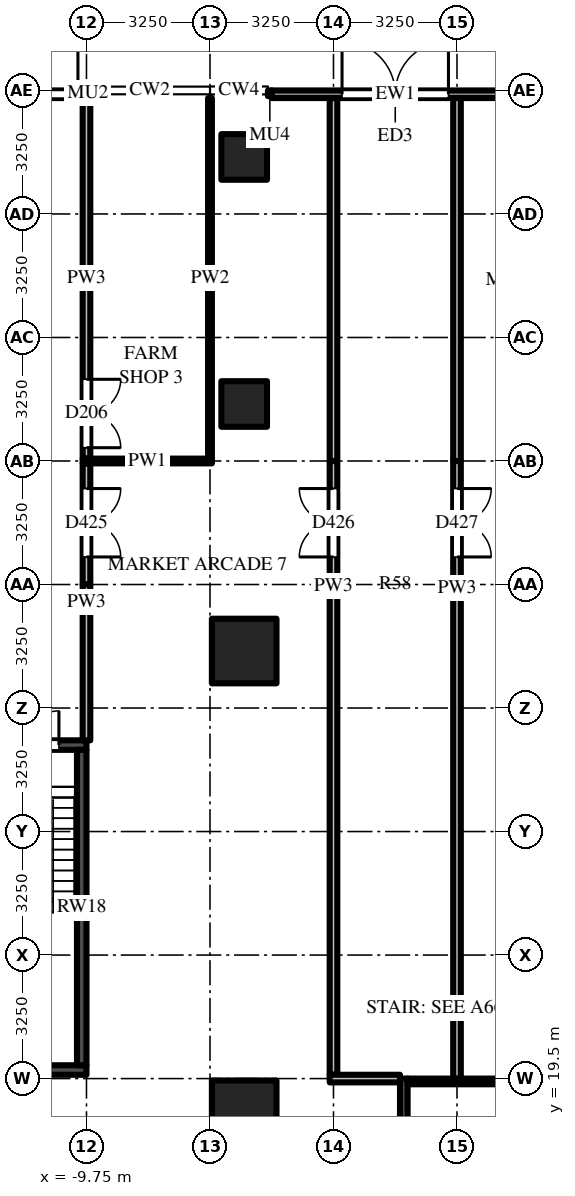
"""IFC4 building model, lengths in metres.
Left out: names, types, materials, properties, quantities, classifications, styles, units other than length and angle.
Written with IfcOpenShell. Run it as: python <this file> out.ifc"""

import sys

from ifc_helpers import new_model, si_unit, direction, frame, frame_2d, origin, origin_2d, place, context, subcontext, project, spatial, rectangle, extrude, source, transform, mapped, element, fill, save


model = new_model("IFC4")
c1 = context("Model", 3, precision=1e-05, world=origin(), true_north=direction((0.0, 1.0)))
c2 = subcontext(c1, "Body", "Model", "MODEL_VIEW")
j1 = project(units=[si_unit("LENGTHUNIT", "METRE"), si_unit("PLANEANGLEUNIT", "RADIAN")], contexts=[c1])
p1 = place(None, origin())
s1 = spatial("IfcSite", under=j1, at=p1, CompositionType="ELEMENT")
p2 = place(p1, origin())
s2 = spatial("IfcBuilding", under=s1, at=p2, CompositionType="ELEMENT")
p3 = place(p2, origin())
s3 = spatial("IfcBuildingStorey", under=s2, at=p3, CompositionType="ELEMENT", Elevation=0.0)
m1 = source(origin(), c2, "Body", "SweptSolid", [
    extrude(rectangle(XDim=1.7, YDim=1.7, at=origin_2d()), origin(), (0.0, 0.0, 1.0), 8.5),
])
for number, where, z_axis, x_axis in (
    (1, (-5.6, 18.6, -0.5), (0.0, 0.0, 1.0), (1.0, 0.0, 0.0)),
    (2, (-5.6, 30.75, -0.5), (0.0, 0.0, 1.0), (1.0, 0.0, 0.0)),
):
    element("IfcColumn", number, at=place(p3, frame(where, z_axis=z_axis, x_axis=x_axis)), inside=s3, PredefinedType="COLUMN", context=c2, shape_type="MappedRepresentation", body=[
        mapped(m1, transform((0.0, 0.0, 0.0))),
    ])
m2 = source(origin(), c2, "Body", "SweptSolid", [
    extrude(rectangle(XDim=1.2, YDim=1.2, at=origin_2d()), origin(), (0.0, 0.0, 1.0), 8.5),
])
for number, where, z_axis, x_axis in (
    (3, (-5.6, 37.25, -0.5), (0.0, 0.0, 1.0), (1.0, 0.0, 0.0)),
    (4, (-5.6, 43.75, -0.5), (0.0, 0.0, 1.0), (1.0, 0.0, 0.0)),
):
    element("IfcColumn", number, at=place(p3, frame(where, z_axis=z_axis, x_axis=x_axis)), inside=s3, PredefinedType="COLUMN", context=c2, shape_type="MappedRepresentation", body=[
        mapped(m2, transform((0.0, 0.0, 0.0))),
    ])
m3 = source(origin(), c2, "Body", "SweptSolid", [
    extrude(rectangle(XDim=6.0, YDim=0.2, at=frame_2d((3.0, 0.0))), origin(), (0.0, 0.0, 1.0), 7.7),
])
p4 = place(p3, frame((-1.4, 13.5, 0.0), z_axis=(0.0, 0.0, 1.0), x_axis=(0.0, 1.0, 0.0)))
e5 = element("IfcWall", 5, at=p4, inside=s3, PredefinedType="SHEAR", context=c2, shape_type="MappedRepresentation", body=[
    mapped(m3, transform((0.0, 0.0, 0.0))),
])
m4 = source(origin(), c2, "Body", "SweptSolid", [
    extrude(rectangle(XDim=2.6, YDim=0.15, at=frame_2d((1.3, 0.0))), origin(), (0.0, 0.0, 1.0), 7.7),
])
p5 = place(p3, frame((-1.3, 19.425, 0.0), z_axis=(0.0, 0.0, 1.0), x_axis=(1.0, 0.0, 0.0)))
e6 = element("IfcWall", 6, at=p5, inside=s3, PredefinedType="SHEAR", context=c2, shape_type="MappedRepresentation", body=[
    mapped(m4, transform((0.0, 0.0, 0.0))),
])
m5 = source(origin(), c2, "Body", "SweptSolid", [
    extrude(rectangle(XDim=6.5, YDim=0.25, at=frame_2d((3.25, 0.0))), origin(), (0.0, 0.0, 1.0), 7.7),
])
p6 = place(p3, frame((-16.25, 28.275, 0.0), z_axis=(0.0, 0.0, 1.0), x_axis=(1.0, 0.0, 0.0)))
e7 = element("IfcWall", 7, at=p6, inside=s3, PredefinedType="SHEAR", context=c2, shape_type="MappedRepresentation", body=[
    mapped(m5, transform((0.0, 0.0, 0.0))),
])
m6 = source(origin(), c2, "Body", "SweptSolid", [
    extrude(rectangle(XDim=1.8, YDim=2.1, at=frame_2d((0.9, 1.05))), frame((0.0, 0.135, 0.0), z_axis=(0.0, -1.0, 0.0), x_axis=(1.0, 0.0, 0.0)), (0.0, 0.0, 1.0), 0.27),
])
p7 = place(p6, frame((0.725, 0.0, 0.0)))
e8 = element("IfcOpeningElement", 8, at=p7, cuts=e7, PredefinedType="OPENING", context=c2, shape_type="MappedRepresentation", body=[
    mapped(m6, transform((0.0, 0.0, 0.0))),
])
p8 = place(p6, frame((3.975, 0.0, 0.0)))
e9 = element("IfcOpeningElement", 9, at=p8, cuts=e7, PredefinedType="OPENING", context=c2, shape_type="MappedRepresentation", body=[
    mapped(m6, transform((0.0, 0.0, 0.0))),
])
p9 = place(p3, frame((-16.25, 19.725, 0.0), z_axis=(0.0, 0.0, 1.0), x_axis=(1.0, 0.0, 0.0)))
e10 = element("IfcWall", 10, at=p9, inside=s3, PredefinedType="SHEAR", context=c2, shape_type="MappedRepresentation", body=[
    mapped(m5, transform((0.0, 0.0, 0.0))),
])
m7 = source(origin(), c2, "Body", "SweptSolid", [
    extrude(rectangle(XDim=8.3, YDim=0.25, at=frame_2d((4.15, 0.0))), origin(), (0.0, 0.0, 1.0), 7.7),
])
p10 = place(p3, frame((-9.875, 19.85, 0.0), z_axis=(0.0, 0.0, 1.0), x_axis=(0.0, 1.0, 0.0)))
e11 = element("IfcWall", 11, at=p10, inside=s3, PredefinedType="SHEAR", context=c2, shape_type="MappedRepresentation", body=[
    mapped(m7, transform((0.0, 0.0, 0.0))),
])
m8 = source(origin(), c2, "Body", "SweptSolid", [
    extrude(rectangle(XDim=6.5, YDim=0.2, at=frame_2d((3.25, 0.0))), origin(), (0.0, 0.0, 1.0), 7.7),
])
p11 = place(p3, frame((-4.875, 45.4, 0.0), z_axis=(0.0, 0.0, 1.0), x_axis=(1.0, 0.0, 0.0)))
e12 = element("IfcWall", 12, at=p11, inside=s3, PredefinedType="SOLIDWALL", context=c2, shape_type="MappedRepresentation", body=[
    mapped(m8, transform((0.0, 0.0, 0.0))),
])
m9 = source(origin(), c2, "Body", "SweptSolid", [
    extrude(rectangle(XDim=2.8, YDim=2.6, at=frame_2d((1.4, 1.3))), frame((0.0, 0.11, 0.0), z_axis=(0.0, -1.0, 0.0), x_axis=(1.0, 0.0, 0.0)), (0.0, 0.0, 1.0), 0.22),
])
p12 = place(p11, frame((1.85, 0.0, 0.0)))
e13 = element("IfcOpeningElement", 13, at=p12, cuts=e12, PredefinedType="OPENING", context=c2, shape_type="MappedRepresentation", body=[
    mapped(m9, transform((0.0, 0.0, 0.0))),
])
m10 = source(origin(), c2, "Body", "SweptSolid", [
    extrude(rectangle(XDim=3.25, YDim=0.2, at=frame_2d((1.625, 0.0))), origin(), (0.0, 0.0, 1.0), 7.7),
])
p13 = place(p3, frame((-13.0, 45.4, 0.0), z_axis=(0.0, 0.0, 1.0), x_axis=(1.0, 0.0, 0.0)))
e14 = element("IfcWall", 14, at=p13, inside=s3, PredefinedType="SOLIDWALL", context=c2, shape_type="MappedRepresentation", body=[
    mapped(m10, transform((0.0, 0.0, 0.0))),
])
m11 = source(origin(), c2, "Body", "SweptSolid", [
    extrude(rectangle(XDim=2.8, YDim=2.4, at=frame_2d((1.4, 1.2))), frame((0.0, 0.11, 0.0), z_axis=(0.0, -1.0, 0.0), x_axis=(1.0, 0.0, 0.0)), (0.0, 0.0, 1.0), 0.22),
])
p14 = place(p13, frame((0.225, 0.0, 0.0)))
e15 = element("IfcOpeningElement", 15, at=p14, cuts=e14, PredefinedType="OPENING", context=c2, shape_type="MappedRepresentation", body=[
    mapped(m11, transform((0.0, 0.0, 0.0))),
])
m12 = source(origin(), c2, "Body", "SweptSolid", [
    extrude(rectangle(XDim=3.188, YDim=0.2, at=frame_2d((1.594, 0.0))), origin(), (0.0, 0.0, 1.0), 6.997),
])
p15 = place(p3, frame((-9.75, 35.688, 0.0), z_axis=(0.0, 0.0, 1.0), x_axis=(0.0, -1.0, 0.0)))
e16 = element("IfcWall", 16, at=p15, inside=s3, PredefinedType="PARTITIONING", context=c2, shape_type="MappedRepresentation", body=[
    mapped(m12, transform((0.0, 0.0, 0.0))),
])
m13 = source(origin(), c2, "Body", "SweptSolid", [
    extrude(rectangle(XDim=1.8, YDim=2.1, at=frame_2d((0.9, 1.05))), frame((0.0, 0.11, 0.0), z_axis=(0.0, -1.0, 0.0), x_axis=(1.0, 0.0, 0.0)), (0.0, 0.0, 1.0), 0.22),
])
p16 = place(p15, frame((0.663, 0.0, 0.0)))
e17 = element("IfcOpeningElement", 17, at=p16, cuts=e16, PredefinedType="OPENING", context=c2, shape_type="MappedRepresentation", body=[
    mapped(m13, transform((0.0, 0.0, 0.0))),
])
m14 = source(origin(), c2, "Body", "SweptSolid", [
    extrude(rectangle(XDim=9.488, YDim=0.2, at=frame_2d((4.744, 0.0))), origin(), (0.0, 0.0, 1.0), 6.762),
])
p17 = place(p3, frame((-9.75, 45.3, 0.0), z_axis=(0.0, 0.0, 1.0), x_axis=(0.0, -1.0, 0.0)))
e18 = element("IfcWall", 18, at=p17, inside=s3, PredefinedType="PARTITIONING", context=c2, shape_type="MappedRepresentation", body=[
    mapped(m14, transform((0.0, 0.0, 0.0))),
])
p18 = place(p17, frame((7.4, 0.0, 0.0)))
e19 = element("IfcOpeningElement", 19, at=p18, cuts=e18, PredefinedType="OPENING", context=c2, shape_type="MappedRepresentation", body=[
    mapped(m13, transform((0.0, 0.0, 0.0))),
])
m15 = source(origin(), c2, "Body", "SweptSolid", [
    extrude(rectangle(XDim=4.1, YDim=0.2, at=frame_2d((2.05, 0.0))), origin(), (0.0, 0.0, 1.0), 6.762),
])
p19 = place(p3, frame((-9.75, 28.4, 0.0), z_axis=(0.0, 0.0, 1.0), x_axis=(0.0, 1.0, 0.0)))
e20 = element("IfcWall", 20, at=p19, inside=s3, PredefinedType="PARTITIONING", context=c2, shape_type="MappedRepresentation", body=[
    mapped(m15, transform((0.0, 0.0, 0.0))),
])
p20 = place(p3, frame((-6.5, 35.812, 0.0), z_axis=(0.0, 0.0, 1.0), x_axis=(0.0, 1.0, 0.0)))
e21 = element("IfcWall", 21, at=p20, inside=s3, PredefinedType="PARTITIONING", context=c2, shape_type="SweptSolid", body=[
    extrude(rectangle(XDim=9.488, YDim=0.1, at=frame_2d((4.744, 0.0))), origin(), (0.0, 0.0, 1.0), 6.762),
])
m16 = source(origin(), c2, "Body", "SweptSolid", [
    extrude(rectangle(XDim=3.25, YDim=0.2, at=frame_2d((1.625, 0.0))), origin(), (0.0, 0.0, 1.0), 6.997),
])
p21 = place(p3, frame((-3.25, 32.5, 0.0), z_axis=(0.0, 0.0, 1.0), x_axis=(0.0, 1.0, 0.0)))
e22 = element("IfcWall", 22, at=p21, inside=s3, PredefinedType="PARTITIONING", context=c2, shape_type="MappedRepresentation", body=[
    mapped(m16, transform((0.0, 0.0, 0.0))),
])
p22 = place(p21, frame((0.725, 0.0, 0.0)))
e23 = element("IfcOpeningElement", 23, at=p22, cuts=e22, PredefinedType="OPENING", context=c2, shape_type="MappedRepresentation", body=[
    mapped(m13, transform((0.0, 0.0, 0.0))),
])
m17 = source(origin(), c2, "Body", "SweptSolid", [
    extrude(rectangle(XDim=12.9, YDim=0.2, at=frame_2d((6.45, 0.0))), origin(), (0.0, 0.0, 1.0), 6.918),
])
p23 = place(p3, frame((-3.25, 19.6, 0.0), z_axis=(0.0, 0.0, 1.0), x_axis=(0.0, 1.0, 0.0)))
e24 = element("IfcWall", 24, at=p23, inside=s3, PredefinedType="PARTITIONING", context=c2, shape_type="MappedRepresentation", body=[
    mapped(m17, transform((0.0, 0.0, 0.0))),
])
m18 = source(origin(), c2, "Body", "SweptSolid", [
    extrude(rectangle(XDim=9.55, YDim=0.2, at=frame_2d((4.775, 0.0))), origin(), (0.0, 0.0, 1.0), 6.918),
])
p24 = place(p3, frame((-3.25, 35.75, 0.0), z_axis=(0.0, 0.0, 1.0), x_axis=(0.0, 1.0, 0.0)))
e25 = element("IfcWall", 25, at=p24, inside=s3, PredefinedType="PARTITIONING", context=c2, shape_type="MappedRepresentation", body=[
    mapped(m18, transform((0.0, 0.0, 0.0))),
])
p25 = place(p3, frame((0.0, 35.75, 0.0), z_axis=(0.0, 0.0, 1.0), x_axis=(0.0, -1.0, 0.0)))
e26 = element("IfcWall", 26, at=p25, inside=s3, PredefinedType="PARTITIONING", context=c2, shape_type="MappedRepresentation", body=[
    mapped(m16, transform((0.0, 0.0, 0.0))),
])
p26 = place(p25, frame((0.725, 0.0, 0.0)))
e27 = element("IfcOpeningElement", 27, at=p26, cuts=e26, PredefinedType="OPENING", context=c2, shape_type="MappedRepresentation", body=[
    mapped(m13, transform((0.0, 0.0, 0.0))),
])
p27 = place(p3, frame((0.0, 45.3, 0.0), z_axis=(0.0, 0.0, 1.0), x_axis=(0.0, -1.0, 0.0)))
e28 = element("IfcWall", 28, at=p27, inside=s3, PredefinedType="PARTITIONING", context=c2, shape_type="MappedRepresentation", body=[
    mapped(m18, transform((0.0, 0.0, 0.0))),
])
m19 = source(origin(), c2, "Body", "SweptSolid", [
    extrude(rectangle(XDim=13.0, YDim=0.2, at=frame_2d((6.5, 0.0))), origin(), (0.0, 0.0, 1.0), 6.918),
])
p28 = place(p3, frame((0.0, 19.5, 0.0), z_axis=(0.0, 0.0, 1.0), x_axis=(0.0, 1.0, 0.0)))
e29 = element("IfcWall", 29, at=p28, inside=s3, PredefinedType="PARTITIONING", context=c2, shape_type="MappedRepresentation", body=[
    mapped(m19, transform((0.0, 0.0, 0.0))),
])
m20 = source(origin(), c2, "Body", "SweptSolid", [
    extrude(rectangle(XDim=1.85, YDim=0.2, at=frame_2d((0.925, 0.0))), origin(), (0.0, 0.0, 1.0), 6.997),
])
p29 = place(p3, frame((-1.5, 19.5, 0.0), z_axis=(0.0, 0.0, 1.0), x_axis=(-1.0, 0.0, 0.0)))
e30 = element("IfcWall", 30, at=p29, inside=s3, PredefinedType="PARTITIONING", context=c2, shape_type="MappedRepresentation", body=[
    mapped(m20, transform((0.0, 0.0, 0.0))),
])
p30 = place(p3, frame((-9.85, 35.75, 0.0), z_axis=(0.0, 0.0, 1.0), x_axis=(1.0, 0.0, 0.0)))
e31 = element("IfcWall", 31, at=p30, inside=s3, PredefinedType="PARTITIONING", context=c2, shape_type="SweptSolid", body=[
    extrude(rectangle(XDim=3.4, YDim=0.125, at=frame_2d((1.7, 0.0))), origin(), (0.0, 0.0, 1.0), 7.7),
])
m21 = source(origin(), c2, "Body", "SweptSolid", [
    extrude(rectangle(XDim=1.8, YDim=2.1, at=frame_2d((0.9, 1.05))), frame((0.0, 0.025, 0.0), z_axis=(0.0, -1.0, 0.0), x_axis=(1.0, 0.0, 0.0)), (0.0, 0.0, 1.0), 0.05),
])
p31 = place(p8, origin())
e32 = element("IfcDoor", 32, at=p31, inside=s3, OperationType="DOUBLE_DOOR_SINGLE_SWING", PredefinedType="DOOR", context=c2, shape_type="MappedRepresentation", body=[
    mapped(m21, transform((0.0, 0.0, 0.0))),
])
fill(e9, e32)
m22 = source(origin(), c2, "Body", "SweptSolid", [
    extrude(rectangle(XDim=2.8, YDim=2.6, at=frame_2d((1.4, 1.3))), frame((0.0, 0.025, 0.0), z_axis=(0.0, -1.0, 0.0), x_axis=(1.0, 0.0, 0.0)), (0.0, 0.0, 1.0), 0.05),
])
p32 = place(p12, origin())
e33 = element("IfcDoor", 33, at=p32, inside=s3, OperationType="DOUBLE_DOOR_SINGLE_SWING", PredefinedType="DOOR", context=c2, shape_type="MappedRepresentation", body=[
    mapped(m22, transform((0.0, 0.0, 0.0))),
])
fill(e13, e33)
m23 = source(origin(), c2, "Body", "SweptSolid", [
    extrude(rectangle(XDim=2.8, YDim=2.4, at=frame_2d((1.4, 1.2))), frame((0.0, 0.025, 0.0), z_axis=(0.0, -1.0, 0.0), x_axis=(1.0, 0.0, 0.0)), (0.0, 0.0, 1.0), 0.05),
])
p33 = place(p14, origin())
e34 = element("IfcDoor", 34, at=p33, inside=s3, OperationType="DOUBLE_DOOR_SINGLE_SWING", PredefinedType="DOOR", context=c2, shape_type="MappedRepresentation", body=[
    mapped(m23, transform((0.0, 0.0, 0.0))),
])
fill(e15, e34)
p34 = place(p16, origin())
e35 = element("IfcDoor", 35, at=p34, inside=s3, OperationType="DOUBLE_DOOR_SINGLE_SWING", PredefinedType="DOOR", context=c2, shape_type="MappedRepresentation", body=[
    mapped(m21, transform((0.0, 0.0, 0.0))),
])
fill(e17, e35)
p35 = place(p22, origin())
e36 = element("IfcDoor", 36, at=p35, inside=s3, OperationType="DOUBLE_DOOR_SINGLE_SWING", PredefinedType="DOOR", context=c2, shape_type="MappedRepresentation", body=[
    mapped(m21, transform((0.0, 0.0, 0.0))),
])
fill(e23, e36)
p36 = place(p26, origin())
e37 = element("IfcDoor", 37, at=p36, inside=s3, OperationType="DOUBLE_DOOR_SINGLE_SWING", PredefinedType="DOOR", context=c2, shape_type="MappedRepresentation", body=[
    mapped(m21, transform((0.0, 0.0, 0.0))),
])
fill(e27, e37)
p37 = place(p18, origin())
e38 = element("IfcDoor", 38, at=p37, inside=s3, OperationType="DOUBLE_DOOR_SINGLE_SWING", PredefinedType="DOOR", context=c2, shape_type="MappedRepresentation", body=[
    mapped(m21, transform((0.0, 0.0, 0.0))),
])
fill(e19, e38)
save(model, sys.argv[1])
